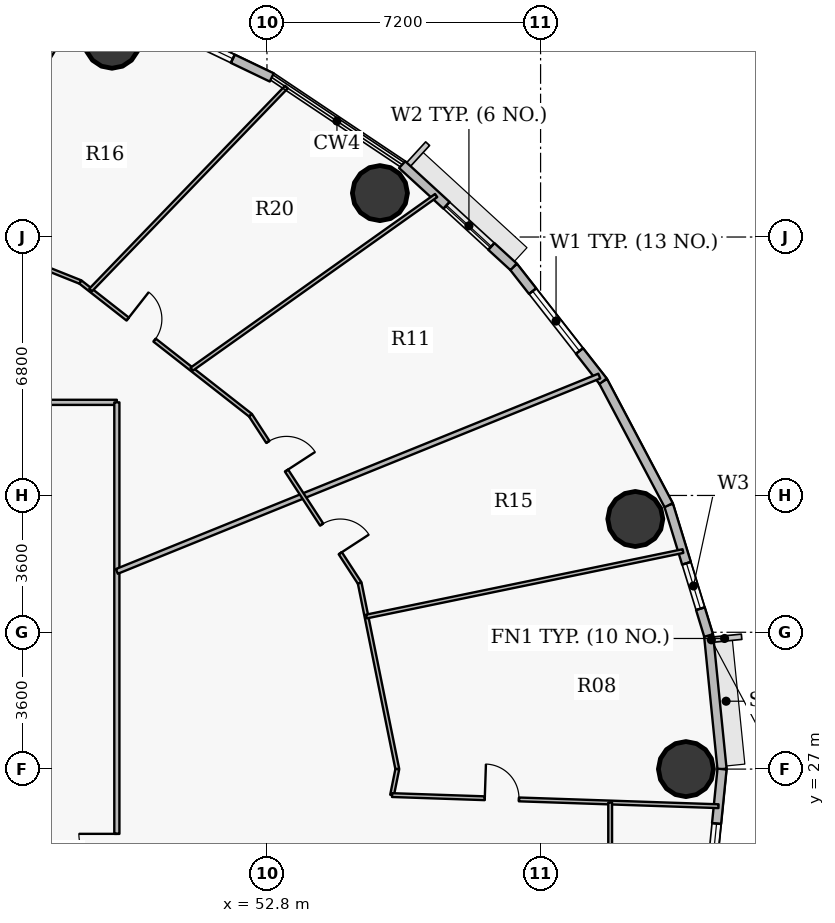
"""IFC4 building model, lengths in metres.
Left out: names, types, materials, properties, quantities, classifications, styles, units other than length and angle.
Written with IfcOpenShell. Run it as: python <this file> out.ifc"""

import sys

from ifc_helpers import new_model, si_unit, direction, frame, frame_2d, origin, origin_2d, place, context, subcontext, project, spatial, rectangle, hollow_circle, extrude, source, transform, mapped, element, fill, save


model = new_model("IFC4")
c1 = context("Model", 3, precision=1e-05, world=origin(), true_north=direction((0.0, 1.0)))
c2 = subcontext(c1, "Body", "Model", "MODEL_VIEW")
j1 = project(units=[si_unit("LENGTHUNIT", "METRE"), si_unit("PLANEANGLEUNIT", "RADIAN")], contexts=[c1])
p1 = place(None, origin())
s1 = spatial("IfcSite", under=j1, at=p1, CompositionType="ELEMENT")
p2 = place(p1, origin())
s2 = spatial("IfcBuilding", under=s1, at=p2, CompositionType="ELEMENT")
p3 = place(p2, frame((0.0, 0.0, 127.2)))
s3 = spatial("IfcBuildingStorey", under=s2, at=p3, CompositionType="ELEMENT", Elevation=127.2)
for number, where, z_axis, x_axis in (
    (1, (63.825, 27.0, 0.0), (0.0, 0.0, 1.0), (1.0, 0.0, 0.0)),
    (2, (62.493, 33.581, 0.0), (0.0, 0.0, 1.0), (1.0, 0.0, 0.0)),
    (3, (55.773, 42.156, 0.0), (0.0, 0.0, 1.0), (1.0, 0.0, 0.0)),
    (4, (48.722, 46.165, 0.0), (0.0, 0.0, 1.0), (1.0, 0.0, 0.0)),
):
    element("IfcColumn", number, at=place(p3, frame(where, z_axis=z_axis, x_axis=x_axis)), inside=s3, PredefinedType="COLUMN", context=c2, shape_type="SweptSolid", body=[
        extrude(hollow_circle(Radius=0.725, WallThickness=0.042, at=origin_2d()), origin(), (0.0, 0.0, 1.0), 3.75),
    ])
p4 = place(p3, frame((64.422, 30.515, 0.0), z_axis=(0.0, 0.0, 1.0), x_axis=(0.099989468229, -0.994988495533, 0.0)))
e5 = element("IfcWall", 5, at=p4, inside=s3, PredefinedType="SOLIDWALL", context=c2, shape_type="SweptSolid", body=[
    extrude(rectangle(XDim=3.533, YDim=0.24, at=frame_2d((1.767, 0.0))), origin(), (0.0, 0.0, 1.0), 3.5),
])
p5 = place(p3, frame((63.37, 33.945, 0.0), z_axis=(0.0, 0.0, 1.0), x_axis=(0.293124431344, -0.956074300329, 0.0)))
e6 = element("IfcWall", 6, at=p5, inside=s3, PredefinedType="SOLIDWALL", context=c2, shape_type="SweptSolid", body=[
    extrude(rectangle(XDim=3.587, YDim=0.24, at=frame_2d((1.793, 0.0))), origin(), (0.0, 0.0, 1.0), 3.5),
])
p6 = place(p5, frame((1.599, 0.0, 0.9)))
e7 = element("IfcOpeningElement", 7, at=p6, cuts=e6, PredefinedType="OPENING", context=c2, shape_type="SweptSolid", body=[
    extrude(rectangle(XDim=1.25, YDim=1.65, at=origin_2d()), frame((0.625, 0.13, 0.825), z_axis=(0.0, -1.0, 0.0), x_axis=(1.0, 0.0, 0.0)), (0.0, 0.0, 1.0), 0.26),
])
p7 = place(p3, frame((61.645, 37.206, 0.0), z_axis=(0.0, 0.0, 1.0), x_axis=(0.467614004126, -0.883932770716, 0.0)))
e8 = element("IfcWall", 8, at=p7, inside=s3, PredefinedType="SOLIDWALL", context=c2, shape_type="SweptSolid", body=[
    extrude(rectangle(XDim=3.689, YDim=0.24, at=frame_2d((1.844, 0.0))), origin(), (0.0, 0.0, 1.0), 3.5),
])
p8 = place(p3, frame((59.289, 40.217, 0.0), z_axis=(0.0, 0.0, 1.0), x_axis=(0.616272103517, -0.787533297345, 0.0)))
e9 = element("IfcWall", 9, at=p8, inside=s3, PredefinedType="SOLIDWALL", context=c2, shape_type="SweptSolid", body=[
    extrude(rectangle(XDim=3.823, YDim=0.24, at=frame_2d((1.912, 0.0))), origin(), (0.0, 0.0, 1.0), 3.5),
])
p9 = place(p8, frame((0.814, 0.0, 0.9)))
e10 = element("IfcOpeningElement", 10, at=p9, cuts=e9, PredefinedType="OPENING", context=c2, shape_type="SweptSolid", body=[
    extrude(rectangle(XDim=2.0, YDim=1.75, at=origin_2d()), frame((1.0, 0.13, 0.875), z_axis=(0.0, -1.0, 0.0), x_axis=(1.0, 0.0, 0.0)), (0.0, 0.0, 1.0), 0.26),
])
p10 = place(p3, frame((56.358, 42.903, 0.0), z_axis=(0.0, 0.0, 1.0), x_axis=(0.737113356241, -0.675769117414, 0.0)))
e11 = element("IfcWall", 11, at=p10, inside=s3, PredefinedType="SOLIDWALL", context=c2, shape_type="SweptSolid", body=[
    extrude(rectangle(XDim=3.976, YDim=0.24, at=frame_2d((1.988, 0.0))), origin(), (0.0, 0.0, 1.0), 3.5),
])
p11 = place(p10, frame((1.583, 0.0, 0.9)))
e12 = element("IfcOpeningElement", 12, at=p11, cuts=e11, PredefinedType="OPENING", context=c2, shape_type="SweptSolid", body=[
    extrude(rectangle(XDim=1.6, YDim=1.75, at=origin_2d()), frame((0.8, 0.13, 0.875), z_axis=(0.0, -1.0, 0.0), x_axis=(1.0, 0.0, 0.0)), (0.0, 0.0, 1.0), 0.26),
])
p12 = place(p3, frame((49.074, 47.047, 0.0), z_axis=(0.0, 0.0, 1.0), x_axis=(0.901589935876, -0.432591709962, 0.0)))
e13 = element("IfcWall", 13, at=p12, inside=s3, PredefinedType="SOLIDWALL", context=c2, shape_type="SweptSolid", body=[
    extrude(rectangle(XDim=4.272, YDim=0.24, at=frame_2d((2.136, 0.0))), origin(), (0.0, 0.0, 1.0), 3.5),
])
p13 = place(p12, frame((1.136, 0.0, 0.9)))
e14 = element("IfcOpeningElement", 14, at=p13, cuts=e13, PredefinedType="OPENING", context=c2, shape_type="SweptSolid", body=[
    extrude(rectangle(XDim=2.0, YDim=1.75, at=origin_2d()), frame((1.0, 0.13, 0.875), z_axis=(0.0, -1.0, 0.0), x_axis=(1.0, 0.0, 0.0)), (0.0, 0.0, 1.0), 0.26),
])
p14 = place(p3, frame((64.775, 27.0, 0.0), z_axis=(0.0, 0.0, 1.0), x_axis=(-0.099989468229, -0.994988495533, 0.0)))
e15 = element("IfcWall", 15, at=p14, inside=s3, PredefinedType="SOLIDWALL", context=c2, shape_type="SweptSolid", body=[
    extrude(rectangle(XDim=3.533, YDim=0.24, at=frame_2d((1.767, 0.0))), origin(), (0.0, 0.0, 1.0), 3.5),
])
p15 = place(p14, frame((1.44, 0.0, 0.9)))
e16 = element("IfcOpeningElement", 16, at=p15, cuts=e15, PredefinedType="OPENING", context=c2, shape_type="SweptSolid", body=[
    extrude(rectangle(XDim=1.25, YDim=1.65, at=origin_2d()), frame((0.625, 0.13, 0.825), z_axis=(0.0, -1.0, 0.0), x_axis=(1.0, 0.0, 0.0)), (0.0, 0.0, 1.0), 0.26),
])
p16 = place(p3, frame((35.323, 36.65, 0.0), z_axis=(0.0, 0.0, 1.0), x_axis=(1.0, 0.0, 0.0)))
e17 = element("IfcWall", 17, at=p16, inside=s3, PredefinedType="PARTITIONING", context=c2, shape_type="SweptSolid", body=[
    extrude(rectangle(XDim=13.527, YDim=0.135, at=frame_2d((6.763, 0.0))), origin(), (0.0, 0.0, 1.0), 2.935),
])
p17 = place(p16, frame((6.263, 0.0, 0.0)))
e18 = element("IfcOpeningElement", 18, at=p17, cuts=e17, PredefinedType="OPENING", context=c2, shape_type="SweptSolid", body=[
    extrude(rectangle(XDim=1.0, YDim=2.15, at=origin_2d()), frame((0.5, 0.078, 1.075), z_axis=(0.0, -1.0, 0.0), x_axis=(1.0, 0.0, 0.0)), (0.0, 0.0, 1.0), 0.155),
])
p18 = place(p3, frame((42.251, 42.066, 0.0), z_axis=(0.0, 0.0, 1.0), x_axis=(0.928803554156, -0.370572473055, 0.0)))
e19 = element("IfcWall", 19, at=p18, inside=s3, PredefinedType="PARTITIONING", context=c2, shape_type="SweptSolid", body=[
    extrude(rectangle(XDim=6.072, YDim=0.1, at=frame_2d((3.036, 0.0))), origin(), (0.0, 0.0, 1.0), 2.935),
])
p19 = place(p18, frame((3.719, 0.0, 0.0)))
e20 = element("IfcOpeningElement", 20, at=p19, cuts=e19, PredefinedType="OPENING", context=c2, shape_type="SweptSolid", body=[
    extrude(rectangle(XDim=0.9, YDim=2.1, at=origin_2d()), frame((0.45, 0.06, 1.05), z_axis=(0.0, -1.0, 0.0), x_axis=(1.0, 0.0, 0.0)), (0.0, 0.0, 1.0), 0.12),
])
p20 = place(p3, frame((44.394, 41.211, 0.0), z_axis=(0.0, 0.0, 1.0), x_axis=(0.508542397454, 0.861036950422, 0.0)))
e21 = element("IfcWall", 21, at=p20, inside=s3, PredefinedType="PARTITIONING", context=c2, shape_type="SweptSolid", body=[
    extrude(rectangle(XDim=7.173, YDim=0.1, at=frame_2d((3.587, 0.0))), origin(), (0.0, 0.0, 1.0), 2.935),
])
p21 = place(p3, frame((47.891, 39.816, 0.0), z_axis=(0.0, 0.0, 1.0), x_axis=(0.787345480673, -0.616512038864, 0.0)))
e22 = element("IfcWall", 22, at=p21, inside=s3, PredefinedType="PARTITIONING", context=c2, shape_type="SweptSolid", body=[
    extrude(rectangle(XDim=5.685, YDim=0.1, at=frame_2d((2.843, 0.0))), origin(), (0.0, 0.0, 1.0), 2.935),
])
p22 = place(p21, frame((1.58, 0.0, 0.0)))
e23 = element("IfcOpeningElement", 23, at=p22, cuts=e22, PredefinedType="OPENING", context=c2, shape_type="SweptSolid", body=[
    extrude(rectangle(XDim=0.9, YDim=2.1, at=origin_2d()), frame((0.45, 0.06, 1.05), z_axis=(0.0, -1.0, 0.0), x_axis=(1.0, 0.0, 0.0)), (0.0, 0.0, 1.0), 0.12),
])
p23 = place(p3, frame((48.16, 39.605, 0.0), z_axis=(0.0, 0.0, 1.0), x_axis=(0.694278615756, 0.719706331571, 0.0)))
e24 = element("IfcWall", 24, at=p23, inside=s3, PredefinedType="PARTITIONING", context=c2, shape_type="SweptSolid", body=[
    extrude(rectangle(XDim=7.422, YDim=0.1, at=frame_2d((3.711, 0.0))), origin(), (0.0, 0.0, 1.0), 2.935),
])
p24 = place(p3, frame((48.85, 17.35, 0.0), z_axis=(0.0, 0.0, 1.0), x_axis=(0.0, 1.0, 0.0)))
e25 = element("IfcWall", 25, at=p24, inside=s3, PredefinedType="PARTITIONING", context=c2, shape_type="SweptSolid", body=[
    extrude(rectangle(XDim=19.3, YDim=0.135, at=frame_2d((9.65, 0.0))), origin(), (0.0, 0.0, 1.0), 2.935),
])
p25 = place(p24, frame((6.946, 0.0, 0.0)))
e26 = element("IfcOpeningElement", 26, at=p25, cuts=e25, PredefinedType="OPENING", context=c2, shape_type="SweptSolid", body=[
    extrude(rectangle(XDim=1.0, YDim=2.15, at=origin_2d()), frame((0.5, 0.078, 1.075), z_axis=(0.0, -1.0, 0.0), x_axis=(1.0, 0.0, 0.0)), (0.0, 0.0, 1.0), 0.155),
])
p26 = place(p3, frame((48.85, 32.202, 0.0), z_axis=(0.0, 0.0, 1.0), x_axis=(0.92691714139, 0.375266056281, 0.0)))
e27 = element("IfcWall", 27, at=p26, inside=s3, PredefinedType="PARTITIONING", context=c2, shape_type="SweptSolid", body=[
    extrude(rectangle(XDim=13.696, YDim=0.135, at=frame_2d((6.848, 0.0))), origin(), (0.0, 0.0, 1.0), 2.935),
])
p27 = place(p3, frame((50.819, 37.523, 0.0), z_axis=(0.0, 0.0, 1.0), x_axis=(0.815321486624, 0.579008526233, 0.0)))
e28 = element("IfcWall", 28, at=p27, inside=s3, PredefinedType="PARTITIONING", context=c2, shape_type="SweptSolid", body=[
    extrude(rectangle(XDim=7.89, YDim=0.1, at=frame_2d((3.945, 0.0))), origin(), (0.0, 0.0, 1.0), 2.935),
])
p28 = place(p3, frame((52.366, 36.311, 0.0), z_axis=(0.0, 0.0, 1.0), x_axis=(0.545405249109, -0.838172484781, 0.0)))
e29 = element("IfcWall", 29, at=p28, inside=s3, PredefinedType="PARTITIONING", context=c2, shape_type="SweptSolid", body=[
    extrude(rectangle(XDim=5.269, YDim=0.1, at=frame_2d((2.634, 0.0))), origin(), (0.0, 0.0, 1.0), 2.935),
])
p29 = place(p28, frame((3.432, 0.0, 0.0)))
e30 = element("IfcOpeningElement", 30, at=p29, cuts=e29, PredefinedType="OPENING", context=c2, shape_type="SweptSolid", body=[
    extrude(rectangle(XDim=0.9, YDim=2.1, at=origin_2d()), frame((0.45, 0.06, 1.05), z_axis=(0.0, -1.0, 0.0), x_axis=(1.0, 0.0, 0.0)), (0.0, 0.0, 1.0), 0.12),
])
p30 = place(p28, frame((0.838, 0.0, 0.0)))
e31 = element("IfcOpeningElement", 31, at=p30, cuts=e29, PredefinedType="OPENING", context=c2, shape_type="SweptSolid", body=[
    extrude(rectangle(XDim=0.9, YDim=2.1, at=origin_2d()), frame((0.45, 0.06, 1.05), z_axis=(0.0, -1.0, 0.0), x_axis=(1.0, 0.0, 0.0)), (0.0, 0.0, 1.0), 0.12),
])
p31 = place(p3, frame((55.24, 31.895, 0.0), z_axis=(0.0, 0.0, 1.0), x_axis=(0.198240417912, -0.980153425085, 0.0)))
e32 = element("IfcWall", 32, at=p31, inside=s3, PredefinedType="PARTITIONING", context=c2, shape_type="SweptSolid", body=[
    extrude(rectangle(XDim=4.994, YDim=0.1, at=frame_2d((2.497, 0.0))), origin(), (0.0, 0.0, 1.0), 2.935),
])
p32 = place(p3, frame((55.418, 31.015, 0.0), z_axis=(0.0, 0.0, 1.0), x_axis=(0.979291441198, 0.202455607966, 0.0)))
e33 = element("IfcWall", 33, at=p32, inside=s3, PredefinedType="PARTITIONING", context=c2, shape_type="SweptSolid", body=[
    extrude(rectangle(XDim=8.504, YDim=0.1, at=frame_2d((4.252, 0.0))), origin(), (0.0, 0.0, 1.0), 2.935),
])
p33 = place(p3, frame((56.092, 26.316, 0.0), z_axis=(0.0, 0.0, 1.0), x_axis=(0.198335504954, 0.980134188504, 0.0)))
e34 = element("IfcWall", 34, at=p33, inside=s3, PredefinedType="PARTITIONING", context=c2, shape_type="SweptSolid", body=[
    extrude(rectangle(XDim=0.698, YDim=0.1, at=frame_2d((0.349, 0.0))), origin(), (0.0, 0.0, 1.0), 2.935),
])
p34 = place(p3, frame((56.092, 26.316, 0.0), z_axis=(0.0, 0.0, 1.0), x_axis=(0.999421848377, -0.033999543924, 0.0)))
e35 = element("IfcWall", 35, at=p34, inside=s3, PredefinedType="PARTITIONING", context=c2, shape_type="SweptSolid", body=[
    extrude(rectangle(XDim=8.595, YDim=0.1, at=frame_2d((4.298, 0.0))), origin(), (0.0, 0.0, 1.0), 2.935),
])
p35 = place(p34, frame((2.441, 0.0, 0.0)))
e36 = element("IfcOpeningElement", 36, at=p35, cuts=e35, PredefinedType="OPENING", context=c2, shape_type="SweptSolid", body=[
    extrude(rectangle(XDim=0.9, YDim=2.1, at=origin_2d()), frame((0.45, 0.06, 1.05), z_axis=(0.0, -1.0, 0.0), x_axis=(1.0, 0.0, 0.0)), (0.0, 0.0, 1.0), 0.12),
])
p36 = place(p3, frame((61.831, 17.135, 0.0), z_axis=(0.0, 0.0, 1.0), x_axis=(0.0, 1.0, 0.0)))
e37 = element("IfcWall", 37, at=p36, inside=s3, PredefinedType="PARTITIONING", context=c2, shape_type="SweptSolid", body=[
    extrude(rectangle(XDim=8.986, YDim=0.1, at=frame_2d((4.493, 0.0))), origin(), (0.0, 0.0, 1.0), 2.935),
])
p37 = place(p36, frame((4.043, 0.0, 0.0)))
e38 = element("IfcOpeningElement", 38, at=p37, cuts=e37, PredefinedType="OPENING", context=c2, shape_type="SweptSolid", body=[
    extrude(rectangle(XDim=0.9, YDim=2.1, at=origin_2d()), frame((0.45, 0.06, 1.05), z_axis=(0.0, -1.0, 0.0), x_axis=(1.0, 0.0, 0.0)), (0.0, 0.0, 1.0), 0.12),
])
m1 = source(origin(), c2, "Body", "SweptSolid", [
    extrude(rectangle(XDim=1.25, YDim=1.65, at=origin_2d()), frame((0.625, 0.03, 0.825), z_axis=(0.0, -1.0, 0.0), x_axis=(1.0, 0.0, 0.0)), (0.0, 0.0, 1.0), 0.06),
])
p38 = place(p6, origin())
e39 = element("IfcWindow", 39, at=p38, inside=s3, PartitioningType="SINGLE_PANEL", PredefinedType="WINDOW", context=c2, shape_type="MappedRepresentation", body=[
    mapped(m1, transform((0.0, 0.0, 0.0), x_axis=(1.0, 0.0, 0.0), y_axis=(0.0, 1.0, 0.0), z_axis=(0.0, 0.0, 1.0), scale=1.0)),
])
fill(e7, e39)
m2 = source(origin(), c2, "Body", "SweptSolid", [
    extrude(rectangle(XDim=2.0, YDim=1.75, at=origin_2d()), frame((1.0, 0.03, 0.875), z_axis=(0.0, -1.0, 0.0), x_axis=(1.0, 0.0, 0.0)), (0.0, 0.0, 1.0), 0.06),
])
p39 = place(p9, origin())
e40 = element("IfcWindow", 40, at=p39, inside=s3, PartitioningType="DOUBLE_PANEL_VERTICAL", PredefinedType="WINDOW", context=c2, shape_type="MappedRepresentation", body=[
    mapped(m2, transform((0.0, 0.0, 0.0), x_axis=(1.0, 0.0, 0.0), y_axis=(0.0, 1.0, 0.0), z_axis=(0.0, 0.0, 1.0), scale=1.0)),
])
fill(e10, e40)
m3 = source(origin(), c2, "Body", "SweptSolid", [
    extrude(rectangle(XDim=1.6, YDim=1.75, at=origin_2d()), frame((0.8, 0.03, 0.875), z_axis=(0.0, -1.0, 0.0), x_axis=(1.0, 0.0, 0.0)), (0.0, 0.0, 1.0), 0.06),
])
p40 = place(p11, origin())
e41 = element("IfcWindow", 41, at=p40, inside=s3, PartitioningType="DOUBLE_PANEL_VERTICAL", PredefinedType="WINDOW", context=c2, shape_type="MappedRepresentation", body=[
    mapped(m3, transform((0.0, 0.0, 0.0), x_axis=(1.0, 0.0, 0.0), y_axis=(0.0, 1.0, 0.0), z_axis=(0.0, 0.0, 1.0), scale=1.0)),
])
fill(e12, e41)
p41 = place(p13, origin())
e42 = element("IfcWindow", 42, at=p41, inside=s3, PartitioningType="DOUBLE_PANEL_VERTICAL", PredefinedType="WINDOW", context=c2, shape_type="MappedRepresentation", body=[
    mapped(m2, transform((0.0, 0.0, 0.0), x_axis=(1.0, 0.0, 0.0), y_axis=(0.0, 1.0, 0.0), z_axis=(0.0, 0.0, 1.0), scale=1.0)),
])
fill(e14, e42)
p42 = place(p15, origin())
e43 = element("IfcWindow", 43, at=p42, inside=s3, PartitioningType="SINGLE_PANEL", PredefinedType="WINDOW", context=c2, shape_type="MappedRepresentation", body=[
    mapped(m1, transform((0.0, 0.0, 0.0), x_axis=(1.0, 0.0, 0.0), y_axis=(0.0, 1.0, 0.0), z_axis=(0.0, 0.0, 1.0), scale=1.0)),
])
fill(e16, e43)
m4 = source(origin(), c2, "Body", "SweptSolid", [
    extrude(rectangle(XDim=1.0, YDim=2.15, at=origin_2d()), frame((0.5, 0.025, 1.075), z_axis=(0.0, -1.0, 0.0), x_axis=(1.0, 0.0, 0.0)), (0.0, 0.0, 1.0), 0.05),
])
p43 = place(p25, origin())
e44 = element("IfcDoor", 44, at=p43, inside=s3, OperationType="SINGLE_SWING_RIGHT", PredefinedType="DOOR", context=c2, shape_type="MappedRepresentation", body=[
    mapped(m4, transform((0.0, 0.0, 0.0), x_axis=(1.0, 0.0, 0.0), y_axis=(0.0, 1.0, 0.0), z_axis=(0.0, 0.0, 1.0), scale=1.0)),
])
fill(e26, e44)
m5 = source(origin(), c2, "Body", "SweptSolid", [
    extrude(rectangle(XDim=0.9, YDim=2.1, at=origin_2d()), frame((0.45, 0.025, 1.05), z_axis=(0.0, -1.0, 0.0), x_axis=(1.0, 0.0, 0.0)), (0.0, 0.0, 1.0), 0.05),
])
p44 = place(p35, origin())
e45 = element("IfcDoor", 45, at=p44, inside=s3, OperationType="SINGLE_SWING_LEFT", PredefinedType="DOOR", context=c2, shape_type="MappedRepresentation", body=[
    mapped(m5, transform((0.0, 0.0, 0.0), x_axis=(1.0, 0.0, 0.0), y_axis=(0.0, 1.0, 0.0), z_axis=(0.0, 0.0, 1.0), scale=1.0)),
])
fill(e36, e45)
p45 = place(p29, origin())
e46 = element("IfcDoor", 46, at=p45, inside=s3, OperationType="SINGLE_SWING_RIGHT", PredefinedType="DOOR", context=c2, shape_type="MappedRepresentation", body=[
    mapped(m5, transform((0.0, 0.0, 0.0), x_axis=(1.0, 0.0, 0.0), y_axis=(0.0, 1.0, 0.0), z_axis=(0.0, 0.0, 1.0), scale=1.0)),
])
fill(e30, e46)
p46 = place(p30, origin())
e47 = element("IfcDoor", 47, at=p46, inside=s3, OperationType="SINGLE_SWING_RIGHT", PredefinedType="DOOR", context=c2, shape_type="MappedRepresentation", body=[
    mapped(m5, transform((0.0, 0.0, 0.0), x_axis=(1.0, 0.0, 0.0), y_axis=(0.0, 1.0, 0.0), z_axis=(0.0, 0.0, 1.0), scale=1.0)),
])
fill(e31, e47)
p47 = place(p22, origin())
e48 = element("IfcDoor", 48, at=p47, inside=s3, OperationType="SINGLE_SWING_LEFT", PredefinedType="DOOR", context=c2, shape_type="MappedRepresentation", body=[
    mapped(m5, transform((0.0, 0.0, 0.0), x_axis=(1.0, 0.0, 0.0), y_axis=(0.0, 1.0, 0.0), z_axis=(0.0, 0.0, 1.0), scale=1.0)),
])
fill(e23, e48)
save(model, sys.argv[1])
